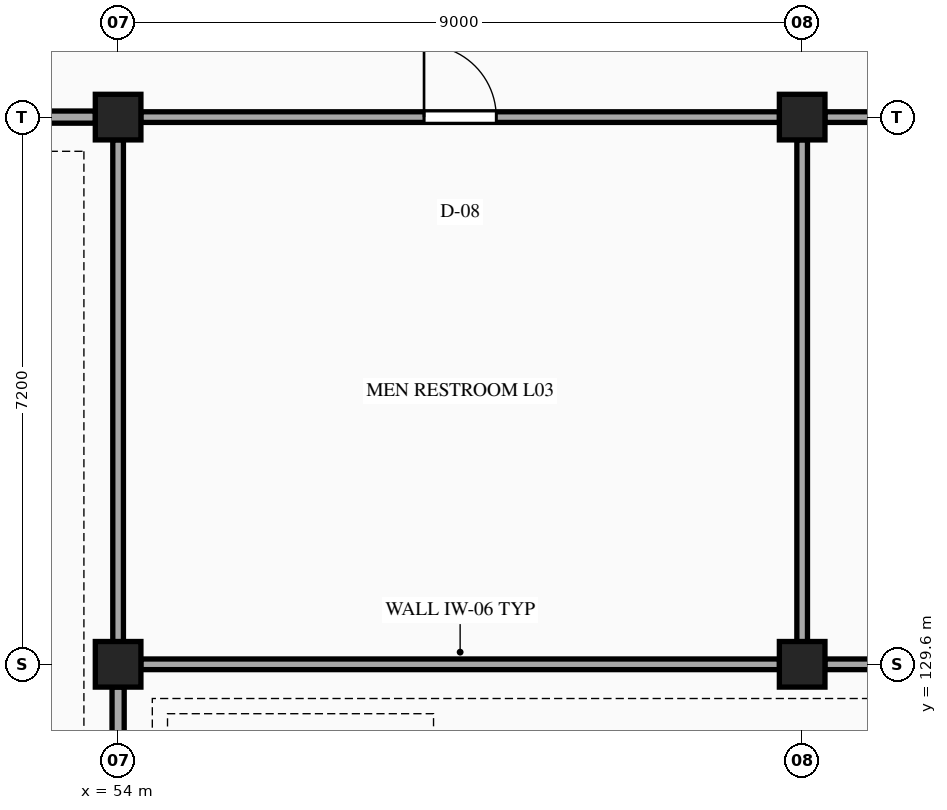
"""IFC4 building model, lengths in metres.
Left out: names, types, materials, properties, quantities, classifications, styles, units other than length and angle.
Written with IfcOpenShell. Run it as: python <this file> out.ifc"""

import sys

from ifc_helpers import new_model, si_unit, direction, frame, frame_2d, origin, origin_2d, place, context, subcontext, project, spatial, rectangle, extrude, element, fill, save


model = new_model("IFC4")
c1 = context("Model", 3, precision=1e-05, world=origin(), true_north=direction((0.0, 1.0)))
c2 = subcontext(c1, "Body", "Model", "MODEL_VIEW")
j1 = project(units=[si_unit("LENGTHUNIT", "METRE"), si_unit("PLANEANGLEUNIT", "RADIAN")], contexts=[c1])
p1 = place(None, origin())
s1 = spatial("IfcSite", under=j1, at=p1, CompositionType="ELEMENT")
p2 = place(p1, origin())
s2 = spatial("IfcBuilding", under=s1, at=p2, CompositionType="ELEMENT")
p3 = place(p2, frame((0.0, 0.0, 15.3)))
s3 = spatial("IfcBuildingStorey", under=s2, at=p3, CompositionType="ELEMENT", Elevation=15.3)
for number, where, z_axis, x_axis in (
    (1, (54.0, 129.6, 0.0), (0.0, 0.0, 1.0), (1.0, 0.0, 0.0)),
    (2, (54.0, 136.8, 0.0), (0.0, 0.0, 1.0), (1.0, 0.0, 0.0)),
    (3, (63.0, 129.6, 0.0), (0.0, 0.0, 1.0), (1.0, 0.0, 0.0)),
    (4, (63.0, 136.8, 0.0), (0.0, 0.0, 1.0), (1.0, 0.0, 0.0)),
):
    element("IfcColumn", number, at=place(p3, frame(where, z_axis=z_axis, x_axis=x_axis)), inside=s3, PredefinedType="COLUMN", context=c2, shape_type="SweptSolid", body=[
        extrude(rectangle(XDim=0.6, YDim=0.6, at=origin_2d()), origin(), (0.0, 0.0, 1.0), 4.5),
    ])
p4 = place(p3, frame((54.298, 129.6, 0.0), z_axis=(0.0, 0.0, 1.0), x_axis=(1.0, 0.0, 0.0)))
e5 = element("IfcWall", 5, at=p4, inside=s3, PredefinedType="PARTITIONING", context=c2, shape_type="SweptSolid", body=[
    extrude(rectangle(XDim=8.404, YDim=0.14, at=frame_2d((4.202, 0.0))), origin(), (0.0, 0.0, 1.0), 3.336),
])
p5 = place(p3, frame((63.298, 129.6, 0.0), z_axis=(0.0, 0.0, 1.0), x_axis=(1.0, 0.0, 0.0)))
e6 = element("IfcWall", 6, at=p5, inside=s3, PredefinedType="PARTITIONING", context=c2, shape_type="SweptSolid", body=[
    extrude(rectangle(XDim=8.404, YDim=0.14, at=frame_2d((4.202, 0.0))), origin(), (0.0, 0.0, 1.0), 3.638),
])
p6 = place(p3, frame((45.298, 136.8, 0.0), z_axis=(0.0, 0.0, 1.0), x_axis=(1.0, 0.0, 0.0)))
e7 = element("IfcWall", 7, at=p6, inside=s3, PredefinedType="PARTITIONING", context=c2, shape_type="SweptSolid", body=[
    extrude(rectangle(XDim=8.404, YDim=0.16, at=frame_2d((4.202, 0.0))), origin(), (0.0, 0.0, 1.0), 3.336),
])
p7 = place(p6, frame((3.402, 0.0, 0.0)))
e8 = element("IfcOpeningElement", 8, at=p7, cuts=e7, PredefinedType="OPENING", context=c2, shape_type="SweptSolid", body=[
    extrude(rectangle(XDim=1.6, YDim=2.2, at=frame_2d((0.8, 1.1))), frame((0.0, 0.09, 0.0), z_axis=(0.0, -1.0, 0.0), x_axis=(1.0, 0.0, 0.0)), (0.0, 0.0, 1.0), 0.18),
])
p8 = place(p3, frame((54.298, 136.8, 0.0), z_axis=(0.0, 0.0, 1.0), x_axis=(1.0, 0.0, 0.0)))
e9 = element("IfcWall", 9, at=p8, inside=s3, PredefinedType="PARTITIONING", context=c2, shape_type="SweptSolid", body=[
    extrude(rectangle(XDim=8.404, YDim=0.14, at=frame_2d((4.202, 0.0))), origin(), (0.0, 0.0, 1.0), 3.336),
])
p9 = place(p8, frame((3.727, 0.0, 0.0)))
e10 = element("IfcOpeningElement", 10, at=p9, cuts=e9, PredefinedType="OPENING", context=c2, shape_type="SweptSolid", body=[
    extrude(rectangle(XDim=0.95, YDim=2.1, at=frame_2d((0.475, 1.05))), frame((0.0, 0.08, 0.0), z_axis=(0.0, -1.0, 0.0), x_axis=(1.0, 0.0, 0.0)), (0.0, 0.0, 1.0), 0.16),
])
p10 = place(p3, frame((63.298, 136.8, 0.0), z_axis=(0.0, 0.0, 1.0), x_axis=(1.0, 0.0, 0.0)))
e11 = element("IfcWall", 11, at=p10, inside=s3, PredefinedType="PARTITIONING", context=c2, shape_type="SweptSolid", body=[
    extrude(rectangle(XDim=8.404, YDim=0.14, at=frame_2d((4.202, 0.0))), origin(), (0.0, 0.0, 1.0), 3.638),
])
p11 = place(p10, frame((3.727, 0.0, 0.0)))
e12 = element("IfcOpeningElement", 12, at=p11, cuts=e11, PredefinedType="OPENING", context=c2, shape_type="SweptSolid", body=[
    extrude(rectangle(XDim=0.95, YDim=2.1, at=frame_2d((0.475, 1.05))), frame((0.0, 0.08, 0.0), z_axis=(0.0, -1.0, 0.0), x_axis=(1.0, 0.0, 0.0)), (0.0, 0.0, 1.0), 0.16),
])
p12 = place(p3, frame((54.0, 122.698, 0.0), z_axis=(0.0, 0.0, 1.0), x_axis=(0.0, 1.0, 0.0)))
e13 = element("IfcWall", 13, at=p12, inside=s3, PredefinedType="PARTITIONING", context=c2, shape_type="SweptSolid", body=[
    extrude(rectangle(XDim=6.604, YDim=0.16, at=frame_2d((3.302, 0.0))), origin(), (0.0, 0.0, 1.0), 3.336),
])
for number, where, z_axis, x_axis in (
    (14, (54.0, 129.898, 0.0), (0.0, 0.0, 1.0), (0.0, 1.0, 0.0)),
    (15, (63.0, 129.898, 0.0), (0.0, 0.0, 1.0), (0.0, 1.0, 0.0)),
):
    element("IfcWall", number, at=place(p3, frame(where, z_axis=z_axis, x_axis=x_axis)), inside=s3, PredefinedType="PARTITIONING", context=c2, shape_type="SweptSolid", body=[
        extrude(rectangle(XDim=6.604, YDim=0.14, at=frame_2d((3.302, 0.0))), origin(), (0.0, 0.0, 1.0), 3.336),
    ])
p13 = place(p9, origin())
e16 = element("IfcDoor", 16, at=p13, inside=s3, OperationType="SINGLE_SWING_LEFT", PredefinedType="DOOR", context=c2, shape_type="SweptSolid", body=[
    extrude(rectangle(XDim=0.95, YDim=2.1, at=frame_2d((0.475, 1.05))), frame((0.0, 0.025, 0.0), z_axis=(0.0, -1.0, 0.0), x_axis=(1.0, 0.0, 0.0)), (0.0, 0.0, 1.0), 0.05),
])
fill(e10, e16)
save(model, sys.argv[1])
